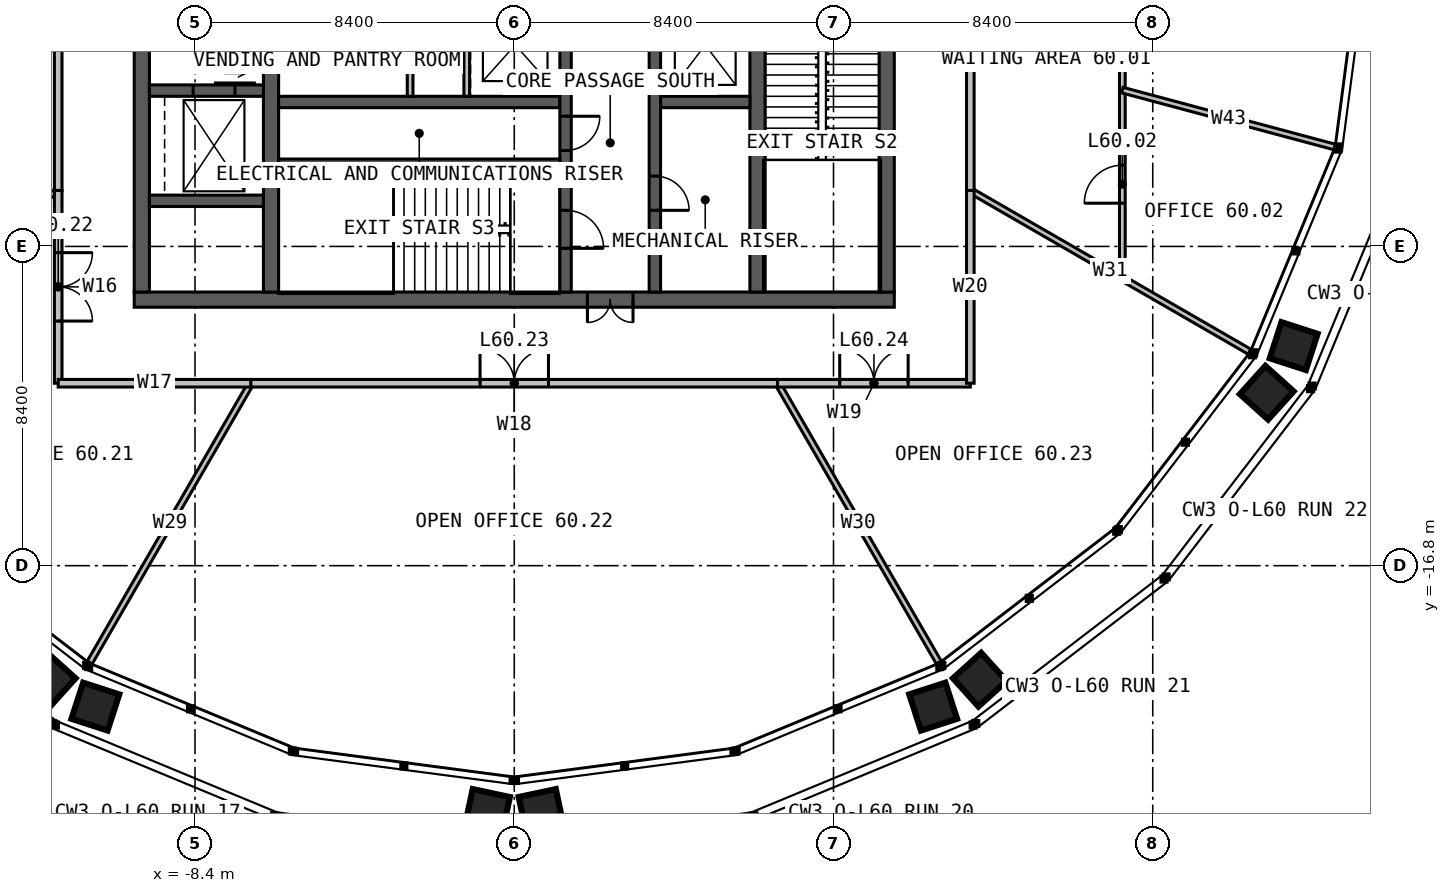
"""IFC4 building model, lengths in metres.
Left out: names, types, materials, properties, quantities, classifications, styles, units other than length and angle.
Written with IfcOpenShell. Run it as: python <this file> out.ifc"""

import sys

from ifc_helpers import new_model, si_unit, direction, frame, frame_2d, origin, place, context, subcontext, project, spatial, rectangle, extrude, element, fill, save


model = new_model("IFC4")
c1 = context("Model", 3, precision=1e-05, world=origin(), true_north=direction((0.0, 1.0)))
c2 = subcontext(c1, "Body", "Model", "MODEL_VIEW")
j1 = project(units=[si_unit("LENGTHUNIT", "METRE"), si_unit("PLANEANGLEUNIT", "RADIAN")], contexts=[c1])
p1 = place(None, origin())
s1 = spatial("IfcSite", under=j1, at=p1, CompositionType="ELEMENT")
p2 = place(p1, origin())
s2 = spatial("IfcBuilding", under=s1, at=p2, CompositionType="ELEMENT")
p3 = place(p2, frame((0.0, 0.0, 248.0)))
s3 = spatial("IfcBuildingStorey", under=s2, at=p3, CompositionType="ELEMENT", Elevation=248.0)
p4 = place(p3, frame((10.0, -9.8, 0.0), z_axis=(0.0, 0.0, 1.0), x_axis=(-1.0, 0.0, 0.0)))
e1 = element("IfcWall", 1, at=p4, inside=s3, PredefinedType="SOLIDWALL", context=c2, shape_type="SweptSolid", body=[
    extrude(rectangle(XDim=20.0, YDim=0.4, at=frame_2d((10.0, 0.0))), origin(), (0.0, 0.0, 1.0), 4.0),
])
p5 = place(p4, frame((6.875, 0.0, 0.0)))
e2 = element("IfcOpeningElement", 2, at=p5, cuts=e1, PredefinedType="OPENING", context=c2, shape_type="SweptSolid", body=[
    extrude(rectangle(XDim=1.2, YDim=2.2, at=frame_2d((0.6, 1.1))), frame((0.0, 0.21, 0.0), z_axis=(0.0, -1.0, 0.0), x_axis=(1.0, 0.0, 0.0)), (0.0, 0.0, 1.0), 0.42),
])
for number, where, z_axis, x_axis in (
    (3, (9.8, -9.6, 0.0), (0.0, 0.0, 1.0), (0.0, 1.0, 0.0)),
    (4, (-9.8, 9.6, 0.0), (0.0, 0.0, 1.0), (0.0, -1.0, 0.0)),
):
    element("IfcWall", number, at=place(p3, frame(where, z_axis=z_axis, x_axis=x_axis)), inside=s3, PredefinedType="SOLIDWALL", context=c2, shape_type="SweptSolid", body=[
        extrude(rectangle(XDim=19.2, YDim=0.4, at=frame_2d((9.6, 0.0))), origin(), (0.0, 0.0, 1.0), 4.0),
    ])
p6 = place(p3, frame((-6.4, -9.6, 0.0), z_axis=(0.0, 0.0, 1.0), x_axis=(0.0, 1.0, 0.0)))
e5 = element("IfcWall", 5, at=p6, inside=s3, PredefinedType="SOLIDWALL", context=c2, shape_type="SweptSolid", body=[
    extrude(rectangle(XDim=19.2, YDim=0.4, at=frame_2d((9.6, 0.0))), origin(), (0.0, 0.0, 1.0), 4.0),
])
p7 = place(p6, frame((9.1, 0.0, 0.0)))
e6 = element("IfcOpeningElement", 6, at=p7, cuts=e5, PredefinedType="OPENING", context=c2, shape_type="SweptSolid", body=[
    extrude(rectangle(XDim=1.0, YDim=2.2, at=frame_2d((0.5, 1.1))), frame((0.0, 0.21, 0.0), z_axis=(0.0, -1.0, 0.0), x_axis=(1.0, 0.0, 0.0)), (0.0, 0.0, 1.0), 0.42),
])
p8 = place(p3, frame((6.4, 9.6, 0.0), z_axis=(0.0, 0.0, 1.0), x_axis=(0.0, -1.0, 0.0)))
e7 = element("IfcWall", 7, at=p8, inside=s3, PredefinedType="SOLIDWALL", context=c2, shape_type="SweptSolid", body=[
    extrude(rectangle(XDim=19.2, YDim=0.4, at=frame_2d((9.6, 0.0))), origin(), (0.0, 0.0, 1.0), 4.0),
])
p9 = place(p8, frame((9.1, 0.0, 0.0)))
e8 = element("IfcOpeningElement", 8, at=p9, cuts=e7, PredefinedType="OPENING", context=c2, shape_type="SweptSolid", body=[
    extrude(rectangle(XDim=1.0, YDim=2.2, at=frame_2d((0.5, 1.1))), frame((0.0, 0.21, 0.0), z_axis=(0.0, -1.0, 0.0), x_axis=(1.0, 0.0, 0.0)), (0.0, 0.0, 1.0), 0.42),
])
p10 = place(p3, frame((-6.2, -4.6, 0.0), z_axis=(0.0, 0.0, 1.0), x_axis=(1.0, 0.0, 0.0)))
e9 = element("IfcWall", 9, at=p10, inside=s3, PredefinedType="SOLIDWALL", context=c2, shape_type="SweptSolid", body=[
    extrude(rectangle(XDim=7.4, YDim=0.3, at=frame_2d((3.7, 0.0))), origin(), (0.0, 0.0, 1.0), 4.0),
])
p11 = place(p3, frame((3.85, -4.6, 0.0), z_axis=(0.0, 0.0, 1.0), x_axis=(1.0, 0.0, 0.0)))
e10 = element("IfcWall", 10, at=p11, inside=s3, PredefinedType="SOLIDWALL", context=c2, shape_type="SweptSolid", body=[
    extrude(rectangle(XDim=2.35, YDim=0.3, at=frame_2d((1.175, 0.0))), origin(), (0.0, 0.0, 1.0), 4.0),
])
p12 = place(p3, frame((1.35, -1.45, 0.0), z_axis=(0.0, 0.0, 1.0), x_axis=(0.0, -1.0, 0.0)))
e11 = element("IfcWall", 11, at=p12, inside=s3, PredefinedType="SOLIDWALL", context=c2, shape_type="SweptSolid", body=[
    extrude(rectangle(XDim=8.15, YDim=0.3, at=frame_2d((4.075, 0.0))), origin(), (0.0, 0.0, 1.0), 4.0),
])
p13 = place(p12, frame((6.0, 0.0, 0.0)))
e12 = element("IfcOpeningElement", 12, at=p13, cuts=e11, PredefinedType="OPENING", context=c2, shape_type="SweptSolid", body=[
    extrude(rectangle(XDim=1.0, YDim=2.2, at=frame_2d((0.5, 1.1))), frame((0.0, 0.16, 0.0), z_axis=(0.0, -1.0, 0.0), x_axis=(1.0, 0.0, 0.0)), (0.0, 0.0, 1.0), 0.32),
])
p14 = place(p12, frame((3.525, 0.0, 0.0)))
e13 = element("IfcOpeningElement", 13, at=p14, cuts=e11, PredefinedType="OPENING", context=c2, shape_type="SweptSolid", body=[
    extrude(rectangle(XDim=0.9, YDim=2.2, at=frame_2d((0.45, 1.1))), frame((0.0, 0.16, 0.0), z_axis=(0.0, -1.0, 0.0), x_axis=(1.0, 0.0, 0.0)), (0.0, 0.0, 1.0), 0.32),
])
p15 = place(p3, frame((3.7, -1.45, 0.0), z_axis=(0.0, 0.0, 1.0), x_axis=(0.0, -1.0, 0.0)))
e14 = element("IfcWall", 14, at=p15, inside=s3, PredefinedType="SOLIDWALL", context=c2, shape_type="SweptSolid", body=[
    extrude(rectangle(XDim=8.15, YDim=0.3, at=frame_2d((4.075, 0.0))), origin(), (0.0, 0.0, 1.0), 4.0),
])
p16 = place(p15, frame((5.1, 0.0, 0.0)))
e15 = element("IfcOpeningElement", 15, at=p16, cuts=e14, PredefinedType="OPENING", context=c2, shape_type="SweptSolid", body=[
    extrude(rectangle(XDim=0.9, YDim=2.2, at=frame_2d((0.45, 1.1))), frame((0.0, 0.16, 0.0), z_axis=(0.0, -1.0, 0.0), x_axis=(1.0, 0.0, 0.0)), (0.0, 0.0, 1.0), 0.32),
])
p17 = place(p3, frame((-6.2, -6.2, 0.0), z_axis=(0.0, 0.0, 1.0), x_axis=(1.0, 0.0, 0.0)))
e16 = element("IfcWall", 16, at=p17, inside=s3, PredefinedType="SOLIDWALL", context=c2, shape_type="SweptSolid", body=[
    extrude(rectangle(XDim=7.4, YDim=0.2, at=frame_2d((3.7, 0.0))), origin(), (0.0, 0.0, 1.0), 4.0),
])
p18 = place(p3, frame((-9.6, -4.3, 0.0), z_axis=(0.0, 0.0, 1.0), x_axis=(1.0, 0.0, 0.0)))
e17 = element("IfcWall", 17, at=p18, inside=s3, PredefinedType="SOLIDWALL", context=c2, shape_type="SweptSolid", body=[
    extrude(rectangle(XDim=3.0, YDim=0.3, at=frame_2d((1.5, 0.0))), origin(), (0.0, 0.0, 1.0), 4.0),
])
p19 = place(p18, frame((1.15, 0.0, 0.0)))
e18 = element("IfcOpeningElement", 18, at=p19, cuts=e17, PredefinedType="OPENING", context=c2, shape_type="SweptSolid", body=[
    extrude(rectangle(XDim=1.1, YDim=2.2, at=frame_2d((0.55, 1.1))), frame((0.0, 0.16, 0.0), z_axis=(0.0, -1.0, 0.0), x_axis=(1.0, 0.0, 0.0)), (0.0, 0.0, 1.0), 0.32),
])
p20 = place(p3, frame((-9.6, -7.2, 0.0), z_axis=(0.0, 0.0, 1.0), x_axis=(1.0, 0.0, 0.0)))
e19 = element("IfcWall", 19, at=p20, inside=s3, PredefinedType="SOLIDWALL", context=c2, shape_type="SweptSolid", body=[
    extrude(rectangle(XDim=3.0, YDim=0.3, at=frame_2d((1.5, 0.0))), origin(), (0.0, 0.0, 1.0), 4.0),
])
for number, where, z_axis, x_axis in (
    (20, (-2.74, -1.75, 0.0), (0.0, 0.0, 1.0), (0.0, -1.0, 0.0)),
    (21, (-1.25, -1.75, 0.0), (0.0, 0.0, 1.0), (0.0, -1.0, 0.0)),
):
    element("IfcWall", number, at=place(p3, frame(where, z_axis=z_axis, x_axis=x_axis)), inside=s3, PredefinedType="PARTITIONING", context=c2, shape_type="SweptSolid", body=[
        extrude(rectangle(XDim=2.7, YDim=0.15, at=frame_2d((1.35, 0.0))), origin(), (0.0, 0.0, 1.0), 3.75),
    ])
for number, where, z_axis, x_axis in (
    (22, (12.0, -6.928, 0.0), (0.0, 0.0, 1.0), (0.866, -0.5, 0.0)),
    (23, (-12.0, -6.928, 0.0), (0.0, 0.0, 1.0), (-0.866, -0.5, 0.0)),
    (24, (-6.928, -12.0, 0.0), (0.0, 0.0, 1.0), (-0.5, -0.866, 0.0)),
    (25, (6.928, -12.0, 0.0), (0.0, 0.0, 1.0), (0.5, -0.866, 0.0)),
):
    element("IfcWall", number, at=place(p3, frame(where, z_axis=z_axis, x_axis=x_axis)), inside=s3, PredefinedType="PARTITIONING", context=c2, shape_type="SweptSolid", body=[
        extrude(rectangle(XDim=8.505, YDim=0.15, at=frame_2d((4.252, 0.0))), origin(), (0.0, 0.0, 1.0), 2.79),
    ])
p21 = place(p3, frame((16.0, -9.238, 0.0), z_axis=(0.0, 0.0, 1.0), x_axis=(0.0, 1.0, 0.0)))
e26 = element("IfcWall", 26, at=p21, inside=s3, PredefinedType="PARTITIONING", context=c2, shape_type="SweptSolid", body=[
    extrude(rectangle(XDim=13.525, YDim=0.15, at=frame_2d((6.762, 0.0))), origin(), (0.0, 0.0, 1.0), 2.79),
])
p22 = place(p21, frame((1.975, 0.0, 0.0)))
e27 = element("IfcOpeningElement", 27, at=p22, cuts=e26, PredefinedType="OPENING", context=c2, shape_type="SweptSolid", body=[
    extrude(rectangle(XDim=1.0, YDim=2.2, at=frame_2d((0.5, 1.1))), frame((0.0, 0.085, 0.0), z_axis=(0.0, -1.0, 0.0), x_axis=(1.0, 0.0, 0.0)), (0.0, 0.0, 1.0), 0.17),
])
p23 = place(p21, frame((7.647, 0.0, 0.0)))
e28 = element("IfcOpeningElement", 28, at=p23, cuts=e26, PredefinedType="OPENING", context=c2, shape_type="SweptSolid", body=[
    extrude(rectangle(XDim=1.0, YDim=2.2, at=frame_2d((0.5, 1.1))), frame((0.0, 0.085, 0.0), z_axis=(0.0, -1.0, 0.0), x_axis=(1.0, 0.0, 0.0)), (0.0, 0.0, 1.0), 0.17),
])
p24 = place(p21, frame((11.934, 0.0, 0.0)))
e29 = element("IfcOpeningElement", 29, at=p24, cuts=e26, PredefinedType="OPENING", context=c2, shape_type="SweptSolid", body=[
    extrude(rectangle(XDim=1.0, YDim=2.2, at=frame_2d((0.5, 1.1))), frame((0.0, 0.085, 0.0), z_axis=(0.0, -1.0, 0.0), x_axis=(1.0, 0.0, 0.0)), (0.0, 0.0, 1.0), 0.17),
])
p25 = place(p3, frame((16.0, -4.287, 0.0), z_axis=(0.0, 0.0, 1.0), x_axis=(0.96591966376, -0.258842042881, 0.0)))
e30 = element("IfcWall", 30, at=p25, inside=s3, PredefinedType="PARTITIONING", context=c2, shape_type="SweptSolid", body=[
    extrude(rectangle(XDim=5.797, YDim=0.15, at=frame_2d((2.898, 0.0))), origin(), (0.0, 0.0, 1.0), 2.79),
])
p26 = place(p3, frame((12.0, -6.928, 0.0), z_axis=(0.0, 0.0, 1.0), x_axis=(0.0, 1.0, 0.0)))
e31 = element("IfcWall", 31, at=p26, inside=s3, PredefinedType="PARTITIONING", context=c2, shape_type="SweptSolid", body=[
    extrude(rectangle(XDim=10.144, YDim=0.2, at=frame_2d((5.072, 0.0))), origin(), (0.0, 0.0, 1.0), 3.8),
])
p27 = place(p26, frame((4.172, 0.0, 0.0)))
e32 = element("IfcOpeningElement", 32, at=p27, cuts=e31, PredefinedType="OPENING", context=c2, shape_type="SweptSolid", body=[
    extrude(rectangle(XDim=1.8, YDim=2.2, at=frame_2d((0.9, 1.1))), frame((0.0, 0.11, 0.0), z_axis=(0.0, -1.0, 0.0), x_axis=(1.0, 0.0, 0.0)), (0.0, 0.0, 1.0), 0.22),
])
p28 = place(p3, frame((-12.0, 6.928, 0.0), z_axis=(0.0, 0.0, 1.0), x_axis=(0.0, -1.0, 0.0)))
e33 = element("IfcWall", 33, at=p28, inside=s3, PredefinedType="PARTITIONING", context=c2, shape_type="SweptSolid", body=[
    extrude(rectangle(XDim=13.856, YDim=0.2, at=frame_2d((6.928, 0.0))), origin(), (0.0, 0.0, 1.0), 3.8),
])
p29 = place(p28, frame((6.028, 0.0, 0.0)))
e34 = element("IfcOpeningElement", 34, at=p29, cuts=e33, PredefinedType="OPENING", context=c2, shape_type="SweptSolid", body=[
    extrude(rectangle(XDim=1.8, YDim=2.2, at=frame_2d((0.9, 1.1))), frame((0.0, 0.11, 0.0), z_axis=(0.0, -1.0, 0.0), x_axis=(1.0, 0.0, 0.0)), (0.0, 0.0, 1.0), 0.22),
])
p30 = place(p3, frame((-12.0, -6.928, 0.0), z_axis=(0.0, 0.0, 1.0), x_axis=(0.0, -1.0, 0.0)))
e35 = element("IfcWall", 35, at=p30, inside=s3, PredefinedType="PARTITIONING", context=c2, shape_type="SweptSolid", body=[
    extrude(rectangle(XDim=5.072, YDim=0.2, at=frame_2d((2.536, 0.0))), origin(), (0.0, 0.0, 1.0), 3.8),
])
p31 = place(p30, frame((1.636, 0.0, 0.0)))
e36 = element("IfcOpeningElement", 36, at=p31, cuts=e35, PredefinedType="OPENING", context=c2, shape_type="SweptSolid", body=[
    extrude(rectangle(XDim=1.8, YDim=2.2, at=frame_2d((0.9, 1.1))), frame((0.0, 0.11, 0.0), z_axis=(0.0, -1.0, 0.0), x_axis=(1.0, 0.0, 0.0)), (0.0, 0.0, 1.0), 0.22),
])
p32 = place(p3, frame((-12.0, -12.0, 0.0), z_axis=(0.0, 0.0, 1.0), x_axis=(1.0, 0.0, 0.0)))
e37 = element("IfcWall", 37, at=p32, inside=s3, PredefinedType="PARTITIONING", context=c2, shape_type="SweptSolid", body=[
    extrude(rectangle(XDim=5.072, YDim=0.2, at=frame_2d((2.536, 0.0))), origin(), (0.0, 0.0, 1.0), 3.8),
])
p33 = place(p3, frame((-6.928, -12.0, 0.0), z_axis=(0.0, 0.0, 1.0), x_axis=(1.0, 0.0, 0.0)))
e38 = element("IfcWall", 38, at=p33, inside=s3, PredefinedType="PARTITIONING", context=c2, shape_type="SweptSolid", body=[
    extrude(rectangle(XDim=13.856, YDim=0.2, at=frame_2d((6.928, 0.0))), origin(), (0.0, 0.0, 1.0), 3.8),
])
p34 = place(p33, frame((6.028, 0.0, 0.0)))
e39 = element("IfcOpeningElement", 39, at=p34, cuts=e38, PredefinedType="OPENING", context=c2, shape_type="SweptSolid", body=[
    extrude(rectangle(XDim=1.8, YDim=2.2, at=frame_2d((0.9, 1.1))), frame((0.0, 0.11, 0.0), z_axis=(0.0, -1.0, 0.0), x_axis=(1.0, 0.0, 0.0)), (0.0, 0.0, 1.0), 0.22),
])
p35 = place(p3, frame((6.928, -12.0, 0.0), z_axis=(0.0, 0.0, 1.0), x_axis=(1.0, 0.0, 0.0)))
e40 = element("IfcWall", 40, at=p35, inside=s3, PredefinedType="PARTITIONING", context=c2, shape_type="SweptSolid", body=[
    extrude(rectangle(XDim=5.072, YDim=0.2, at=frame_2d((2.536, 0.0))), origin(), (0.0, 0.0, 1.0), 3.8),
])
p36 = place(p35, frame((1.636, 0.0, 0.0)))
e41 = element("IfcOpeningElement", 41, at=p36, cuts=e40, PredefinedType="OPENING", context=c2, shape_type="SweptSolid", body=[
    extrude(rectangle(XDim=1.8, YDim=2.2, at=frame_2d((0.9, 1.1))), frame((0.0, 0.11, 0.0), z_axis=(0.0, -1.0, 0.0), x_axis=(1.0, 0.0, 0.0)), (0.0, 0.0, 1.0), 0.22),
])
p37 = place(p3, frame((12.0, -12.0, 0.0), z_axis=(0.0, 0.0, 1.0), x_axis=(0.0, 1.0, 0.0)))
e42 = element("IfcWall", 42, at=p37, inside=s3, PredefinedType="PARTITIONING", context=c2, shape_type="SweptSolid", body=[
    extrude(rectangle(XDim=5.072, YDim=0.2, at=frame_2d((2.536, 0.0))), origin(), (0.0, 0.0, 1.0), 3.8),
])
p38 = place(p5, origin())
e43 = element("IfcDoor", 43, at=p38, inside=s3, OperationType="DOUBLE_DOOR_SINGLE_SWING", PredefinedType="DOOR", context=c2, shape_type="SweptSolid", body=[
    extrude(rectangle(XDim=1.2, YDim=2.2, at=frame_2d((0.6, 1.1))), frame((0.0, 0.025, 0.0), z_axis=(0.0, -1.0, 0.0), x_axis=(1.0, 0.0, 0.0)), (0.0, 0.0, 1.0), 0.05),
])
fill(e2, e43)
p39 = place(p13, origin())
e44 = element("IfcDoor", 44, at=p39, inside=s3, OperationType="SINGLE_SWING_RIGHT", PredefinedType="DOOR", context=c2, shape_type="SweptSolid", body=[
    extrude(rectangle(XDim=1.0, YDim=2.2, at=frame_2d((0.5, 1.1))), frame((0.0, 0.025, 0.0), z_axis=(0.0, -1.0, 0.0), x_axis=(1.0, 0.0, 0.0)), (0.0, 0.0, 1.0), 0.05),
])
fill(e12, e44)
p40 = place(p14, origin())
e45 = element("IfcDoor", 45, at=p40, inside=s3, OperationType="SINGLE_SWING_LEFT", PredefinedType="DOOR", context=c2, shape_type="SweptSolid", body=[
    extrude(rectangle(XDim=0.9, YDim=2.2, at=frame_2d((0.45, 1.1))), frame((0.0, 0.025, 0.0), z_axis=(0.0, -1.0, 0.0), x_axis=(1.0, 0.0, 0.0)), (0.0, 0.0, 1.0), 0.05),
])
fill(e13, e45)
p41 = place(p16, origin())
e46 = element("IfcDoor", 46, at=p41, inside=s3, OperationType="SINGLE_SWING_RIGHT", PredefinedType="DOOR", context=c2, shape_type="SweptSolid", body=[
    extrude(rectangle(XDim=0.9, YDim=2.2, at=frame_2d((0.45, 1.1))), frame((0.0, 0.025, 0.0), z_axis=(0.0, -1.0, 0.0), x_axis=(1.0, 0.0, 0.0)), (0.0, 0.0, 1.0), 0.05),
])
fill(e15, e46)
p42 = place(p19, origin())
e47 = element("IfcDoor", 47, at=p42, inside=s3, OperationType="SLIDING_TO_LEFT", PredefinedType="DOOR", context=c2, shape_type="SweptSolid", body=[
    extrude(rectangle(XDim=1.1, YDim=2.2, at=frame_2d((0.55, 1.1))), frame((0.0, 0.025, 0.0), z_axis=(0.0, -1.0, 0.0), x_axis=(1.0, 0.0, 0.0)), (0.0, 0.0, 1.0), 0.05),
])
fill(e18, e47)
p43 = place(p22, origin())
e48 = element("IfcDoor", 48, at=p43, inside=s3, OperationType="SINGLE_SWING_LEFT", PredefinedType="DOOR", context=c2, shape_type="SweptSolid", body=[
    extrude(rectangle(XDim=1.0, YDim=2.2, at=frame_2d((0.5, 1.1))), frame((0.0, 0.025, 0.0), z_axis=(0.0, -1.0, 0.0), x_axis=(1.0, 0.0, 0.0)), (0.0, 0.0, 1.0), 0.05),
])
fill(e27, e48)
p44 = place(p31, origin())
e49 = element("IfcDoor", 49, at=p44, inside=s3, OperationType="DOUBLE_DOOR_SINGLE_SWING", PredefinedType="DOOR", context=c2, shape_type="SweptSolid", body=[
    extrude(rectangle(XDim=1.8, YDim=2.2, at=frame_2d((0.9, 1.1))), frame((0.0, 0.025, 0.0), z_axis=(0.0, -1.0, 0.0), x_axis=(1.0, 0.0, 0.0)), (0.0, 0.0, 1.0), 0.05),
])
fill(e36, e49)
p45 = place(p34, origin())
e50 = element("IfcDoor", 50, at=p45, inside=s3, OperationType="DOUBLE_DOOR_SINGLE_SWING", PredefinedType="DOOR", context=c2, shape_type="SweptSolid", body=[
    extrude(rectangle(XDim=1.8, YDim=2.2, at=frame_2d((0.9, 1.1))), frame((0.0, 0.025, 0.0), z_axis=(0.0, -1.0, 0.0), x_axis=(1.0, 0.0, 0.0)), (0.0, 0.0, 1.0), 0.05),
])
fill(e39, e50)
p46 = place(p36, origin())
e51 = element("IfcDoor", 51, at=p46, inside=s3, OperationType="DOUBLE_DOOR_SINGLE_SWING", PredefinedType="DOOR", context=c2, shape_type="SweptSolid", body=[
    extrude(rectangle(XDim=1.8, YDim=2.2, at=frame_2d((0.9, 1.1))), frame((0.0, 0.025, 0.0), z_axis=(0.0, -1.0, 0.0), x_axis=(1.0, 0.0, 0.0)), (0.0, 0.0, 1.0), 0.05),
])
fill(e41, e51)
save(model, sys.argv[1])
